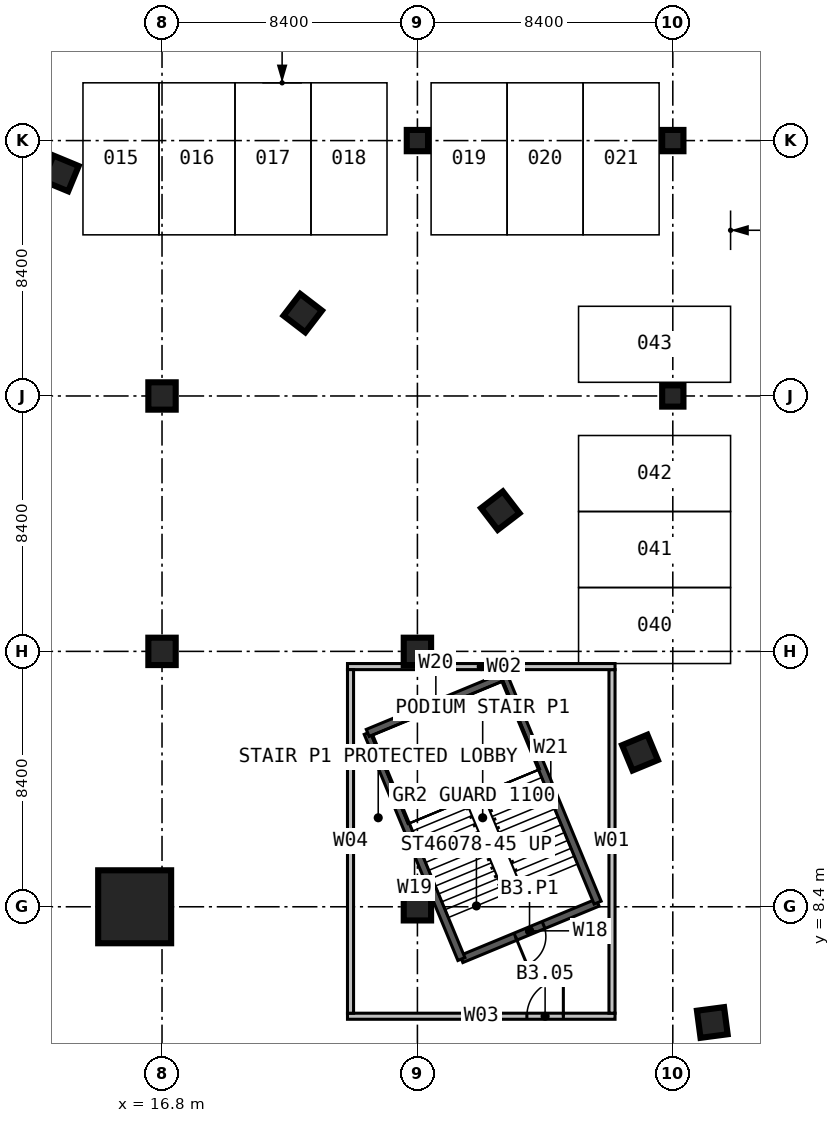
"""IFC4 building model, lengths in metres.
Left out: names, types, materials, properties, quantities, classifications, styles, units other than length and angle.
Written with IfcOpenShell. Run it as: python <this file> out.ifc"""

import sys

from ifc_helpers import new_model, si_unit, direction, frame, frame_2d, origin, origin_2d, place, context, subcontext, project, spatial, rectangle, extrude, element, fill, save


model = new_model("IFC4")
c1 = context("Model", 3, precision=1e-05, world=origin(), true_north=direction((0.0, 1.0)))
c2 = subcontext(c1, "Body", "Model", "MODEL_VIEW")
j1 = project(units=[si_unit("LENGTHUNIT", "METRE"), si_unit("PLANEANGLEUNIT", "RADIAN")], contexts=[c1])
p1 = place(None, origin())
s1 = spatial("IfcSite", under=j1, at=p1, CompositionType="ELEMENT")
p2 = place(p1, origin())
s2 = spatial("IfcBuilding", under=s1, at=p2, CompositionType="ELEMENT")
p3 = place(p2, frame((0.0, 0.0, -13.5)))
s3 = spatial("IfcBuildingStorey", under=s2, at=p3, CompositionType="ELEMENT", Elevation=-13.5)
p4 = place(p3, frame((15.9, 8.4, 0.0), z_axis=(0.0, 0.0, 1.0), x_axis=(1.0, 0.0, 0.0)))
e1 = element("IfcColumn", 1, at=p4, inside=s3, PredefinedType="COLUMN", context=c2, shape_type="SweptSolid", body=[
    extrude(rectangle(XDim=2.4, YDim=2.4, at=origin_2d()), origin(), (0.0, 0.0, 1.0), 4.5),
])
for number, where, z_axis, x_axis in (
    (2, (16.8, 16.8, 0.0), (0.0, 0.0, 1.0), (1.0, 0.0, 0.0)),
    (3, (16.8, 25.2, 0.0), (0.0, 0.0, 1.0), (1.0, 0.0, 0.0)),
    (4, (25.2, 8.4, 0.0), (0.0, 0.0, 1.0), (1.0, 0.0, 0.0)),
    (5, (25.2, 16.8, 0.0), (0.0, 0.0, 1.0), (1.0, 0.0, 0.0)),
):
    element("IfcColumn", number, at=place(p3, frame(where, z_axis=z_axis, x_axis=x_axis)), inside=s3, PredefinedType="COLUMN", context=c2, shape_type="SweptSolid", body=[
        extrude(rectangle(XDim=0.9, YDim=0.9, at=origin_2d()), origin(), (0.0, 0.0, 1.0), 4.5),
    ])
for number, where, z_axis, x_axis in (
    (6, (25.2, 33.6, 0.0), (0.0, 0.0, 1.0), (1.0, 0.0, 0.0)),
    (7, (33.6, 25.2, 0.0), (0.0, 0.0, 1.0), (1.0, 0.0, 0.0)),
    (8, (33.6, 33.6, 0.0), (0.0, 0.0, 1.0), (1.0, 0.0, 0.0)),
):
    element("IfcColumn", number, at=place(p3, frame(where, z_axis=z_axis, x_axis=x_axis)), inside=s3, PredefinedType="COLUMN", context=c2, shape_type="SweptSolid", body=[
        extrude(rectangle(XDim=0.7, YDim=0.7, at=origin_2d()), origin(), (0.0, 0.0, 1.0), 4.5),
    ])
for number, where, z_axis, x_axis in (
    (9, (34.899, 4.594, 0.0), (0.0, 0.0, 1.0), (0.991, 0.131, 0.0)),
    (10, (32.521, 13.47, 0.0), (0.0, 0.0, 1.0), (0.924, 0.383, 0.0)),
    (11, (27.926, 21.428, 0.0), (0.0, 0.0, 1.0), (0.793, 0.609, 0.0)),
    (12, (21.428, 27.926, 0.0), (0.0, 0.0, 1.0), (0.609, 0.793, 0.0)),
    (13, (13.47, 32.521, 0.0), (0.0, 0.0, 1.0), (0.383, 0.924, 0.0)),
):
    element("IfcColumn", number, at=place(p3, frame(where, z_axis=z_axis, x_axis=x_axis)), inside=s3, PredefinedType="COLUMN", context=c2, shape_type="SweptSolid", body=[
        extrude(rectangle(XDim=0.9, YDim=0.9, at=origin_2d()), origin(), (0.0, 0.0, 1.0), 4.5),
    ])
p5 = place(p3, frame((31.127, 8.537, 0.0), z_axis=(0.0, 0.0, 1.0), x_axis=(-0.923880627248, -0.382680789426, 0.0)))
e14 = element("IfcWall", 14, at=p5, inside=s3, PredefinedType="SOLIDWALL", context=c2, shape_type="SweptSolid", body=[
    extrude(rectangle(XDim=4.85, YDim=0.25, at=frame_2d((2.425, 0.0))), origin(), (0.0, 0.0, 1.0), 4.5),
])
p6 = place(p5, frame((1.925, 0.0, 0.0)))
e15 = element("IfcOpeningElement", 15, at=p6, cuts=e14, PredefinedType="OPENING", context=c2, shape_type="SweptSolid", body=[
    extrude(rectangle(XDim=1.0, YDim=2.2, at=frame_2d((0.5, 1.1))), frame((0.0, 0.135, 0.0), z_axis=(0.0, -1.0, 0.0), x_axis=(1.0, 0.0, 0.0)), (0.0, 0.0, 1.0), 0.27),
])
p7 = place(p3, frame((26.647, 6.681, 0.0), z_axis=(0.0, 0.0, 1.0), x_axis=(-0.382689294869, 0.923877104161, 0.0)))
e16 = element("IfcWall", 16, at=p7, inside=s3, PredefinedType="SOLIDWALL", context=c2, shape_type="SweptSolid", body=[
    extrude(rectangle(XDim=8.05, YDim=0.25, at=frame_2d((4.025, 0.0))), origin(), (0.0, 0.0, 1.0), 4.5),
])
p8 = place(p3, frame((23.566, 14.118, 0.0), z_axis=(0.0, 0.0, 1.0), x_axis=(0.923862828997, 0.382723755727, 0.0)))
e17 = element("IfcWall", 17, at=p8, inside=s3, PredefinedType="SOLIDWALL", context=c2, shape_type="SweptSolid", body=[
    extrude(rectangle(XDim=4.85, YDim=0.25, at=frame_2d((2.425, 0.0))), origin(), (0.0, 0.0, 1.0), 4.5),
])
p9 = place(p3, frame((28.047, 15.974, 0.0), z_axis=(0.0, 0.0, 1.0), x_axis=(0.382678572144, -0.923881545666, 0.0)))
e18 = element("IfcWall", 18, at=p9, inside=s3, PredefinedType="SOLIDWALL", context=c2, shape_type="SweptSolid", body=[
    extrude(rectangle(XDim=8.05, YDim=0.25, at=frame_2d((4.025, 0.0))), origin(), (0.0, 0.0, 1.0), 4.5),
])
p10 = place(p3, frame((22.9, 4.8, 0.0), z_axis=(0.0, 0.0, 1.0), x_axis=(1.0, 0.0, 0.0)))
e19 = element("IfcWall", 19, at=p10, inside=s3, PredefinedType="PARTITIONING", context=c2, shape_type="SweptSolid", body=[
    extrude(rectangle(XDim=8.8, YDim=0.2, at=frame_2d((4.4, 0.0))), origin(), (0.0, 0.0, 1.0), 4.2),
])
p11 = place(p10, frame((5.9, 0.0, 0.0)))
e20 = element("IfcOpeningElement", 20, at=p11, cuts=e19, PredefinedType="OPENING", context=c2, shape_type="SweptSolid", body=[
    extrude(rectangle(XDim=1.2, YDim=2.2, at=frame_2d((0.6, 1.1))), frame((0.0, 0.11, 0.0), z_axis=(0.0, -1.0, 0.0), x_axis=(1.0, 0.0, 0.0)), (0.0, 0.0, 1.0), 0.22),
])
p12 = place(p3, frame((31.6, 4.9, 0.0), z_axis=(0.0, 0.0, 1.0), x_axis=(0.0, 1.0, 0.0)))
e21 = element("IfcWall", 21, at=p12, inside=s3, PredefinedType="PARTITIONING", context=c2, shape_type="SweptSolid", body=[
    extrude(rectangle(XDim=11.3, YDim=0.2, at=frame_2d((5.65, 0.0))), origin(), (0.0, 0.0, 1.0), 4.2),
])
p13 = place(p3, frame((31.7, 16.3, 0.0), z_axis=(0.0, 0.0, 1.0), x_axis=(-1.0, 0.0, 0.0)))
e22 = element("IfcWall", 22, at=p13, inside=s3, PredefinedType="PARTITIONING", context=c2, shape_type="SweptSolid", body=[
    extrude(rectangle(XDim=8.8, YDim=0.2, at=frame_2d((4.4, 0.0))), origin(), (0.0, 0.0, 1.0), 4.2),
])
p14 = place(p3, frame((23.0, 16.2, 0.0), z_axis=(0.0, 0.0, 1.0), x_axis=(0.0, -1.0, 0.0)))
e23 = element("IfcWall", 23, at=p14, inside=s3, PredefinedType="PARTITIONING", context=c2, shape_type="SweptSolid", body=[
    extrude(rectangle(XDim=11.3, YDim=0.2, at=frame_2d((5.65, 0.0))), origin(), (0.0, 0.0, 1.0), 4.2),
])
p15 = place(p6, origin())
e24 = element("IfcDoor", 24, at=p15, inside=s3, OperationType="SINGLE_SWING_RIGHT", PredefinedType="DOOR", context=c2, shape_type="SweptSolid", body=[
    extrude(rectangle(XDim=1.0, YDim=2.2, at=frame_2d((0.5, 1.1))), frame((0.0, 0.025, 0.0), z_axis=(0.0, -1.0, 0.0), x_axis=(1.0, 0.0, 0.0)), (0.0, 0.0, 1.0), 0.05),
])
fill(e15, e24)
p16 = place(p11, origin())
e25 = element("IfcDoor", 25, at=p16, inside=s3, OperationType="SINGLE_SWING_RIGHT", PredefinedType="DOOR", context=c2, shape_type="SweptSolid", body=[
    extrude(rectangle(XDim=1.2, YDim=2.2, at=frame_2d((0.6, 1.1))), frame((0.0, 0.025, 0.0), z_axis=(0.0, -1.0, 0.0), x_axis=(1.0, 0.0, 0.0)), (0.0, 0.0, 1.0), 0.05),
])
fill(e20, e25)
save(model, sys.argv[1])
